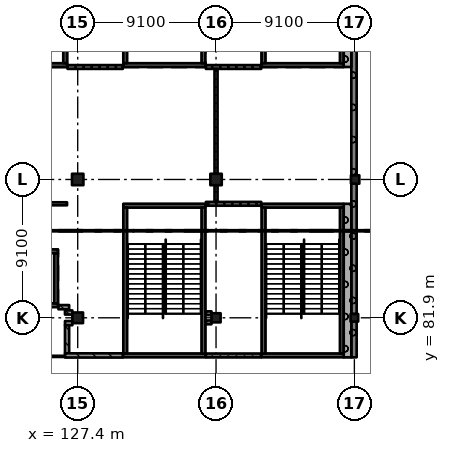
"""IFC4 building model, lengths in metres.
Left out: names, types, materials, properties, quantities, classifications, styles, units other than length and angle.
Written with IfcOpenShell. Run it as: python <this file> out.ifc"""

import sys

from ifc_helpers import new_model, si_unit, direction, frame, frame_2d, origin, origin_2d, place, context, subcontext, project, spatial, rectangle, extrude, element, fill, save


model = new_model("IFC4")
c1 = context("Model", 3, precision=1e-05, world=origin(), true_north=direction((0.0, 1.0)))
c2 = subcontext(c1, "Body", "Model", "MODEL_VIEW")
j1 = project(units=[si_unit("LENGTHUNIT", "METRE"), si_unit("PLANEANGLEUNIT", "RADIAN")], contexts=[c1])
p1 = place(None, origin())
s1 = spatial("IfcSite", under=j1, at=p1, CompositionType="ELEMENT")
p2 = place(p1, origin())
s2 = spatial("IfcBuilding", under=s1, at=p2, CompositionType="ELEMENT")
p3 = place(p2, frame((0.0, 0.0, 10.92)))
s3 = spatial("IfcBuildingStorey", under=s2, at=p3, CompositionType="ELEMENT", Elevation=10.92)
p4 = place(p3, frame((127.4, 81.9, 0.0), z_axis=(0.0, 0.0, 1.0), x_axis=(1.0, 0.0, 0.0)))
e1 = element("IfcColumn", 1, at=p4, inside=s3, PredefinedType="COLUMN", context=c2, shape_type="SweptSolid", body=[
    extrude(rectangle(XDim=0.7, YDim=0.7, at=origin_2d()), origin(), (0.0, 0.0, 1.0), 4.55),
])
p5 = place(p3, frame((127.4, 91.0, 0.0), z_axis=(0.0, 0.0, 1.0), x_axis=(1.0, 0.0, 0.0)))
e2 = element("IfcColumn", 2, at=p5, inside=s3, PredefinedType="COLUMN", context=c2, shape_type="SweptSolid", body=[
    extrude(rectangle(XDim=0.75, YDim=0.75, at=origin_2d()), origin(), (0.0, 0.0, 1.0), 4.55),
])
p6 = place(p3, frame((136.5, 81.9, 0.0), z_axis=(0.0, 0.0, 1.0), x_axis=(1.0, 0.0, 0.0)))
e3 = element("IfcColumn", 3, at=p6, inside=s3, PredefinedType="COLUMN", context=c2, shape_type="SweptSolid", body=[
    extrude(rectangle(XDim=0.6, YDim=0.6, at=origin_2d()), origin(), (0.0, 0.0, 1.0), 4.55),
])
p7 = place(p3, frame((136.5, 91.0, 0.0), z_axis=(0.0, 0.0, 1.0), x_axis=(1.0, 0.0, 0.0)))
e4 = element("IfcColumn", 4, at=p7, inside=s3, PredefinedType="COLUMN", context=c2, shape_type="SweptSolid", body=[
    extrude(rectangle(XDim=0.75, YDim=0.75, at=origin_2d()), origin(), (0.0, 0.0, 1.0), 4.55),
])
p8 = place(p3, frame((145.6, 81.9, 0.0), z_axis=(0.0, 0.0, 1.0), x_axis=(1.0, 0.0, 0.0)))
e5 = element("IfcColumn", 5, at=p8, inside=s3, PredefinedType="COLUMN", context=c2, shape_type="SweptSolid", body=[
    extrude(rectangle(XDim=0.5, YDim=0.5, at=origin_2d()), origin(), (0.0, 0.0, 1.0), 4.55),
])
p9 = place(p3, frame((145.65, 91.0, 0.0), z_axis=(0.0, 0.0, 1.0), x_axis=(1.0, 0.0, 0.0)))
e6 = element("IfcColumn", 6, at=p9, inside=s3, PredefinedType="COLUMN", context=c2, shape_type="SweptSolid", body=[
    extrude(rectangle(XDim=0.55, YDim=0.55, at=origin_2d()), origin(), (0.0, 0.0, 1.0), 4.55),
])
p10 = place(p3, frame((126.1, 82.725, 0.0), z_axis=(0.0, 0.0, 1.0), x_axis=(-1.0, 0.0, 0.0)))
e7 = element("IfcWall", 7, at=p10, inside=s3, PredefinedType="SHEAR", context=c2, shape_type="SweptSolid", body=[
    extrude(rectangle(XDim=3.0, YDim=0.25, at=frame_2d((1.5, 0.0))), origin(), (0.0, 0.0, 1.0), 4.55),
])
p11 = place(p3, frame((126.1, 86.275, 0.0), z_axis=(0.0, 0.0, 1.0), x_axis=(-1.0, 0.0, 0.0)))
e8 = element("IfcWall", 8, at=p11, inside=s3, PredefinedType="SHEAR", context=c2, shape_type="SweptSolid", body=[
    extrude(rectangle(XDim=3.0, YDim=0.25, at=frame_2d((1.5, 0.0))), origin(), (0.0, 0.0, 1.0), 4.55),
])
p12 = place(p11, frame((0.95, 0.0, 0.0)))
e9 = element("IfcOpeningElement", 9, at=p12, cuts=e8, PredefinedType="OPENING", context=c2, shape_type="SweptSolid", body=[
    extrude(rectangle(XDim=1.1, YDim=2.1, at=frame_2d((0.55, 1.05))), frame((0.0, 0.135, 0.0), z_axis=(0.0, -1.0, 0.0), x_axis=(1.0, 0.0, 0.0)), (0.0, 0.0, 1.0), 0.27),
])
p13 = place(p3, frame((125.975, 86.15, 0.0), z_axis=(0.0, 0.0, 1.0), x_axis=(0.0, -1.0, 0.0)))
e10 = element("IfcWall", 10, at=p13, inside=s3, PredefinedType="SHEAR", context=c2, shape_type="SweptSolid", body=[
    extrude(rectangle(XDim=3.3, YDim=0.25, at=frame_2d((1.65, 0.0))), origin(), (0.0, 0.0, 1.0), 4.55),
])
p14 = place(p3, frame((144.9, 98.525, 0.0), z_axis=(0.0, 0.0, 1.0), x_axis=(-1.0, 0.0, 0.0)))
e11 = element("IfcWall", 11, at=p14, inside=s3, PredefinedType="SHEAR", context=c2, shape_type="SweptSolid", body=[
    extrude(rectangle(XDim=5.4, YDim=0.25, at=frame_2d((2.7, 0.0))), origin(), (0.0, 0.0, 1.0), 4.55),
])
p15 = place(p14, frame((1.5, 0.0, 0.0)))
e12 = element("IfcOpeningElement", 12, at=p15, cuts=e11, PredefinedType="OPENING", context=c2, shape_type="SweptSolid", body=[
    extrude(rectangle(XDim=2.4, YDim=2.1, at=frame_2d((1.2, 1.05))), frame((0.0, 0.135, 0.0), z_axis=(0.0, -1.0, 0.0), x_axis=(1.0, 0.0, 0.0)), (0.0, 0.0, 1.0), 0.27),
])
for number, where, z_axis, x_axis in (
    (13, (139.625, 108.25, 0.0), (0.0, 0.0, 1.0), (0.0, -1.0, 0.0)),
    (14, (144.775, 108.25, 0.0), (0.0, 0.0, 1.0), (0.0, -1.0, 0.0)),
):
    element("IfcWall", number, at=place(p3, frame(where, z_axis=z_axis, x_axis=x_axis)), inside=s3, PredefinedType="SHEAR", context=c2, shape_type="SweptSolid", body=[
        extrude(rectangle(XDim=9.6, YDim=0.25, at=frame_2d((4.8, 0.0))), origin(), (0.0, 0.0, 1.0), 4.55),
    ])
p16 = place(p3, frame((135.8, 98.525, 0.0), z_axis=(0.0, 0.0, 1.0), x_axis=(-1.0, 0.0, 0.0)))
e15 = element("IfcWall", 15, at=p16, inside=s3, PredefinedType="SHEAR", context=c2, shape_type="SweptSolid", body=[
    extrude(rectangle(XDim=5.4, YDim=0.25, at=frame_2d((2.7, 0.0))), origin(), (0.0, 0.0, 1.0), 4.55),
])
p17 = place(p16, frame((1.5, 0.0, 0.0)))
e16 = element("IfcOpeningElement", 16, at=p17, cuts=e15, PredefinedType="OPENING", context=c2, shape_type="SweptSolid", body=[
    extrude(rectangle(XDim=2.4, YDim=2.1, at=frame_2d((1.2, 1.05))), frame((0.0, 0.135, 0.0), z_axis=(0.0, -1.0, 0.0), x_axis=(1.0, 0.0, 0.0)), (0.0, 0.0, 1.0), 0.27),
])
for number, where, z_axis, x_axis in (
    (17, (130.525, 108.25, 0.0), (0.0, 0.0, 1.0), (0.0, -1.0, 0.0)),
    (18, (135.675, 108.25, 0.0), (0.0, 0.0, 1.0), (0.0, -1.0, 0.0)),
):
    element("IfcWall", number, at=place(p3, frame(where, z_axis=z_axis, x_axis=x_axis)), inside=s3, PredefinedType="SHEAR", context=c2, shape_type="SweptSolid", body=[
        extrude(rectangle(XDim=9.6, YDim=0.25, at=frame_2d((4.8, 0.0))), origin(), (0.0, 0.0, 1.0), 4.55),
    ])
p18 = place(p3, frame((126.7, 98.525, 0.0), z_axis=(0.0, 0.0, 1.0), x_axis=(-1.0, 0.0, 0.0)))
e19 = element("IfcWall", 19, at=p18, inside=s3, PredefinedType="SHEAR", context=c2, shape_type="SweptSolid", body=[
    extrude(rectangle(XDim=5.4, YDim=0.25, at=frame_2d((2.7, 0.0))), origin(), (0.0, 0.0, 1.0), 4.55),
])
p19 = place(p18, frame((1.5, 0.0, 0.0)))
e20 = element("IfcOpeningElement", 20, at=p19, cuts=e19, PredefinedType="OPENING", context=c2, shape_type="SweptSolid", body=[
    extrude(rectangle(XDim=2.4, YDim=2.1, at=frame_2d((1.2, 1.05))), frame((0.0, 0.135, 0.0), z_axis=(0.0, -1.0, 0.0), x_axis=(1.0, 0.0, 0.0)), (0.0, 0.0, 1.0), 0.27),
])
p20 = place(p3, frame((126.575, 108.25, 0.0), z_axis=(0.0, 0.0, 1.0), x_axis=(0.0, -1.0, 0.0)))
e21 = element("IfcWall", 21, at=p20, inside=s3, PredefinedType="SHEAR", context=c2, shape_type="SweptSolid", body=[
    extrude(rectangle(XDim=9.6, YDim=0.25, at=frame_2d((4.8, 0.0))), origin(), (0.0, 0.0, 1.0), 4.55),
])
p21 = place(p3, frame((144.9, 79.425, 0.0), z_axis=(0.0, 0.0, 1.0), x_axis=(-1.0, 0.0, 0.0)))
e22 = element("IfcWall", 22, at=p21, inside=s3, PredefinedType="SHEAR", context=c2, shape_type="SweptSolid", body=[
    extrude(rectangle(XDim=5.4, YDim=0.25, at=frame_2d((2.7, 0.0))), origin(), (0.0, 0.0, 1.0), 4.55),
])
p22 = place(p3, frame((144.9, 89.275, 0.0), z_axis=(0.0, 0.0, 1.0), x_axis=(-1.0, 0.0, 0.0)))
e23 = element("IfcWall", 23, at=p22, inside=s3, PredefinedType="SHEAR", context=c2, shape_type="SweptSolid", body=[
    extrude(rectangle(XDim=5.4, YDim=0.25, at=frame_2d((2.7, 0.0))), origin(), (0.0, 0.0, 1.0), 4.55),
])
p23 = place(p22, frame((1.5, 0.0, 0.0)))
e24 = element("IfcOpeningElement", 24, at=p23, cuts=e23, PredefinedType="OPENING", context=c2, shape_type="SweptSolid", body=[
    extrude(rectangle(XDim=2.4, YDim=2.1, at=frame_2d((1.2, 1.05))), frame((0.0, 0.135, 0.0), z_axis=(0.0, -1.0, 0.0), x_axis=(1.0, 0.0, 0.0)), (0.0, 0.0, 1.0), 0.27),
])
for number, where, z_axis, x_axis in (
    (25, (139.625, 89.15, 0.0), (0.0, 0.0, 1.0), (0.0, -1.0, 0.0)),
    (26, (144.775, 89.15, 0.0), (0.0, 0.0, 1.0), (0.0, -1.0, 0.0)),
):
    element("IfcWall", number, at=place(p3, frame(where, z_axis=z_axis, x_axis=x_axis)), inside=s3, PredefinedType="SHEAR", context=c2, shape_type="SweptSolid", body=[
        extrude(rectangle(XDim=9.6, YDim=0.25, at=frame_2d((4.8, 0.0))), origin(), (0.0, 0.0, 1.0), 4.55),
    ])
p24 = place(p3, frame((135.8, 79.425, 0.0), z_axis=(0.0, 0.0, 1.0), x_axis=(-1.0, 0.0, 0.0)))
e27 = element("IfcWall", 27, at=p24, inside=s3, PredefinedType="SHEAR", context=c2, shape_type="SweptSolid", body=[
    extrude(rectangle(XDim=5.4, YDim=0.25, at=frame_2d((2.7, 0.0))), origin(), (0.0, 0.0, 1.0), 4.55),
])
p25 = place(p3, frame((135.8, 89.275, 0.0), z_axis=(0.0, 0.0, 1.0), x_axis=(-1.0, 0.0, 0.0)))
e28 = element("IfcWall", 28, at=p25, inside=s3, PredefinedType="SHEAR", context=c2, shape_type="SweptSolid", body=[
    extrude(rectangle(XDim=5.4, YDim=0.25, at=frame_2d((2.7, 0.0))), origin(), (0.0, 0.0, 1.0), 4.55),
])
p26 = place(p25, frame((1.5, 0.0, 0.0)))
e29 = element("IfcOpeningElement", 29, at=p26, cuts=e28, PredefinedType="OPENING", context=c2, shape_type="SweptSolid", body=[
    extrude(rectangle(XDim=2.4, YDim=2.1, at=frame_2d((1.2, 1.05))), frame((0.0, 0.135, 0.0), z_axis=(0.0, -1.0, 0.0), x_axis=(1.0, 0.0, 0.0)), (0.0, 0.0, 1.0), 0.27),
])
for number, where, z_axis, x_axis in (
    (30, (130.525, 89.15, 0.0), (0.0, 0.0, 1.0), (0.0, -1.0, 0.0)),
    (31, (135.675, 89.15, 0.0), (0.0, 0.0, 1.0), (0.0, -1.0, 0.0)),
):
    element("IfcWall", number, at=place(p3, frame(where, z_axis=z_axis, x_axis=x_axis)), inside=s3, PredefinedType="SHEAR", context=c2, shape_type="SweptSolid", body=[
        extrude(rectangle(XDim=9.6, YDim=0.25, at=frame_2d((4.8, 0.0))), origin(), (0.0, 0.0, 1.0), 4.55),
    ])
p27 = place(p3, frame((145.575, 79.3, 0.0), z_axis=(0.0, 0.0, 1.0), x_axis=(0.0, 1.0, 0.0)))
e32 = element("IfcWall", 32, at=p27, inside=s3, PredefinedType="SOLIDWALL", context=c2, shape_type="SweptSolid", body=[
    extrude(rectangle(XDim=2.35, YDim=0.35, at=frame_2d((1.175, 0.0))), origin(), (0.0, 0.0, 1.0), 3.5),
])
for number, where, z_axis, x_axis in (
    (33, (145.575, 82.15, 0.0), (0.0, 0.0, 1.0), (0.0, 1.0, 0.0)),
    (34, (145.575, 91.275, 0.0), (0.0, 0.0, 1.0), (0.0, 1.0, 0.0)),
):
    element("IfcWall", number, at=place(p3, frame(where, z_axis=z_axis, x_axis=x_axis)), inside=s3, PredefinedType="SOLIDWALL", context=c2, shape_type="SweptSolid", body=[
        extrude(rectangle(XDim=8.575, YDim=0.35, at=frame_2d((4.288, 0.0))), origin(), (0.0, 0.0, 1.0), 3.5),
    ])
p28 = place(p3, frame((145.15, 98.4, 0.0), z_axis=(0.0, 0.0, 1.0), x_axis=(0.0, 1.0, 0.0)))
e35 = element("IfcWall", 35, at=p28, inside=s3, PredefinedType="SOLIDWALL", context=c2, shape_type="SweptSolid", body=[
    extrude(rectangle(XDim=10.1, YDim=0.5, at=frame_2d((5.05, 0.0))), origin(), (0.0, 0.0, 1.0), 4.55),
])
p29 = place(p3, frame((145.15, 79.3, 0.0), z_axis=(0.0, 0.0, 1.0), x_axis=(0.0, 1.0, 0.0)))
e36 = element("IfcWall", 36, at=p29, inside=s3, PredefinedType="SOLIDWALL", context=c2, shape_type="SweptSolid", body=[
    extrude(rectangle(XDim=10.1, YDim=0.5, at=frame_2d((5.05, 0.0))), origin(), (0.0, 0.0, 1.0), 4.55),
])
p30 = place(p3, frame((126.13, 82.6, 0.0), z_axis=(0.0, 0.0, 1.0), x_axis=(1.0, 0.0, 0.0)))
e37 = element("IfcWall", 37, at=p30, inside=s3, PredefinedType="SOLIDWALL", context=c2, shape_type="SweptSolid", body=[
    extrude(rectangle(XDim=0.708, YDim=0.275, at=frame_2d((0.354, 0.0))), origin(), (0.0, 0.0, 1.0), 4.25),
])
p31 = place(p3, frame((126.562, 81.55, 0.0), z_axis=(0.0, 0.0, 1.0), x_axis=(1.0, 0.0, 0.0)))
e38 = element("IfcWall", 38, at=p31, inside=s3, PredefinedType="SOLIDWALL", context=c2, shape_type="SweptSolid", body=[
    extrude(rectangle(XDim=0.488, YDim=0.275, at=frame_2d((0.244, 0.0))), origin(), (0.0, 0.0, 1.0), 4.25),
])
p32 = place(p3, frame((126.7, 79.562, 0.0), z_axis=(0.0, 0.0, 1.0), x_axis=(0.0, 1.0, 0.0)))
e39 = element("IfcWall", 39, at=p32, inside=s3, PredefinedType="SOLIDWALL", context=c2, shape_type="SweptSolid", body=[
    extrude(rectangle(XDim=1.85, YDim=0.275, at=frame_2d((0.925, 0.0))), origin(), (0.0, 0.0, 1.0), 4.25),
])
p33 = place(p3, frame((126.7, 89.4, 0.0), z_axis=(0.0, 0.0, 1.0), x_axis=(-1.0, 0.0, 0.0)))
e40 = element("IfcWall", 40, at=p33, inside=s3, PredefinedType="PARTITIONING", context=c2, shape_type="SweptSolid", body=[
    extrude(rectangle(XDim=5.4, YDim=0.2, at=frame_2d((2.7, 0.0))), origin(), (0.0, 0.0, 1.0), 4.25),
])
p34 = place(p33, frame((1.85, 0.0, 0.0)))
e41 = element("IfcOpeningElement", 41, at=p34, cuts=e40, PredefinedType="OPENING", context=c2, shape_type="SweptSolid", body=[
    extrude(rectangle(XDim=1.8, YDim=2.4, at=frame_2d((0.9, 1.2))), frame((0.0, 0.11, 0.0), z_axis=(0.0, -1.0, 0.0), x_axis=(1.0, 0.0, 0.0)), (0.0, 0.0, 1.0), 0.22),
])
p35 = place(p3, frame((126.73, 98.4, 0.0), z_axis=(0.0, 0.0, 1.0), x_axis=(1.0, 0.0, 0.0)))
e42 = element("IfcWall", 42, at=p35, inside=s3, PredefinedType="SOLIDWALL", context=c2, shape_type="SweptSolid", body=[
    extrude(rectangle(XDim=3.64, YDim=0.25, at=frame_2d((1.82, 0.0))), origin(), (0.0, 0.0, 1.0), 4.25),
])
p36 = place(p35, frame((1.35, 0.0, 0.0)))
e43 = element("IfcOpeningElement", 43, at=p36, cuts=e42, PredefinedType="OPENING", context=c2, shape_type="SweptSolid", body=[
    extrude(rectangle(XDim=1.0, YDim=2.1, at=frame_2d((0.5, 1.05))), frame((0.0, 0.135, 0.0), z_axis=(0.0, -1.0, 0.0), x_axis=(1.0, 0.0, 0.0)), (0.0, 0.0, 1.0), 0.27),
])
p37 = place(p3, frame((127.05, 82.25, 0.0), z_axis=(0.0, 0.0, 1.0), x_axis=(-1.0, 0.0, 0.0)))
e44 = element("IfcWall", 44, at=p37, inside=s3, PredefinedType="SOLIDWALL", context=c2, shape_type="SweptSolid", body=[
    extrude(rectangle(XDim=0.488, YDim=0.275, at=frame_2d((0.244, 0.0))), origin(), (0.0, 0.0, 1.0), 4.25),
])
p38 = place(p3, frame((130.37, 79.425, 0.0), z_axis=(0.0, 0.0, 1.0), x_axis=(-1.0, 0.0, 0.0)))
e45 = element("IfcWall", 45, at=p38, inside=s3, PredefinedType="SOLIDWALL", context=c2, shape_type="SweptSolid", body=[
    extrude(rectangle(XDim=3.808, YDim=0.275, at=frame_2d((1.904, 0.0))), origin(), (0.0, 0.0, 1.0), 4.25),
])
p39 = place(p3, frame((135.83, 81.6, 0.0), z_axis=(0.0, 0.0, 1.0), x_axis=(1.0, 0.0, 0.0)))
e46 = element("IfcWall", 46, at=p39, inside=s3, PredefinedType="SOLIDWALL", context=c2, shape_type="SweptSolid", body=[
    extrude(rectangle(XDim=0.37, YDim=0.25, at=frame_2d((0.185, 0.0))), origin(), (0.0, 0.0, 1.0), 4.25),
])
p40 = place(p3, frame((135.83, 98.4, 0.0), z_axis=(0.0, 0.0, 1.0), x_axis=(1.0, 0.0, 0.0)))
e47 = element("IfcWall", 47, at=p40, inside=s3, PredefinedType="SOLIDWALL", context=c2, shape_type="SweptSolid", body=[
    extrude(rectangle(XDim=3.64, YDim=0.25, at=frame_2d((1.82, 0.0))), origin(), (0.0, 0.0, 1.0), 4.25),
])
p41 = place(p40, frame((1.72, 0.0, 0.0)))
e48 = element("IfcOpeningElement", 48, at=p41, cuts=e47, PredefinedType="OPENING", context=c2, shape_type="SweptSolid", body=[
    extrude(rectangle(XDim=0.8, YDim=2.1, at=frame_2d((0.4, 1.05))), frame((0.0, 0.135, 0.0), z_axis=(0.0, -1.0, 0.0), x_axis=(1.0, 0.0, 0.0)), (0.0, 0.0, 1.0), 0.27),
])
p42 = place(p3, frame((136.2, 82.2, 0.0), z_axis=(0.0, 0.0, 1.0), x_axis=(-1.0, 0.0, 0.0)))
e49 = element("IfcWall", 49, at=p42, inside=s3, PredefinedType="SOLIDWALL", context=c2, shape_type="SweptSolid", body=[
    extrude(rectangle(XDim=0.37, YDim=0.25, at=frame_2d((0.185, 0.0))), origin(), (0.0, 0.0, 1.0), 4.25),
])
p43 = place(p3, frame((135.83, 89.4, 0.0), z_axis=(0.0, 0.0, 1.0), x_axis=(1.0, 0.0, 0.0)))
e50 = element("IfcWall", 50, at=p43, inside=s3, PredefinedType="SOLIDWALL", context=c2, shape_type="SweptSolid", body=[
    extrude(rectangle(XDim=3.64, YDim=0.25, at=frame_2d((1.82, 0.0))), origin(), (0.0, 0.0, 1.0), 4.25),
])
p44 = place(p43, frame((1.79, 0.0, 0.0)))
e51 = element("IfcOpeningElement", 51, at=p44, cuts=e50, PredefinedType="OPENING", context=c2, shape_type="SweptSolid", body=[
    extrude(rectangle(XDim=0.8, YDim=2.1, at=frame_2d((0.4, 1.05))), frame((0.0, 0.135, 0.0), z_axis=(0.0, -1.0, 0.0), x_axis=(1.0, 0.0, 0.0)), (0.0, 0.0, 1.0), 0.27),
])
p45 = place(p3, frame((136.5, 89.525, 0.0), z_axis=(0.0, 0.0, 1.0), x_axis=(0.0, 1.0, 0.0)))
e52 = element("IfcWall", 52, at=p45, inside=s3, PredefinedType="PARTITIONING", context=c2, shape_type="SweptSolid", body=[
    extrude(rectangle(XDim=1.1, YDim=0.2, at=frame_2d((0.55, 0.0))), origin(), (0.0, 0.0, 1.0), 3.5),
])
p46 = place(p3, frame((136.5, 91.375, 0.0), z_axis=(0.0, 0.0, 1.0), x_axis=(0.0, 1.0, 0.0)))
e53 = element("IfcWall", 53, at=p46, inside=s3, PredefinedType="PARTITIONING", context=c2, shape_type="SweptSolid", body=[
    extrude(rectangle(XDim=6.9, YDim=0.2, at=frame_2d((3.45, 0.0))), origin(), (0.0, 0.0, 1.0), 3.55),
])
p47 = place(p46, frame((0.85, 0.0, 0.0)))
e54 = element("IfcOpeningElement", 54, at=p47, cuts=e53, PredefinedType="OPENING", context=c2, shape_type="SweptSolid", body=[
    extrude(rectangle(XDim=1.8, YDim=2.4, at=frame_2d((0.9, 1.2))), frame((0.0, 0.11, 0.0), z_axis=(0.0, -1.0, 0.0), x_axis=(1.0, 0.0, 0.0)), (0.0, 0.0, 1.0), 0.22),
])
p48 = place(p46, frame((4.25, 0.0, 0.0)))
e55 = element("IfcOpeningElement", 55, at=p48, cuts=e53, PredefinedType="OPENING", context=c2, shape_type="SweptSolid", body=[
    extrude(rectangle(XDim=1.8, YDim=2.4, at=frame_2d((0.9, 1.2))), frame((0.0, 0.11, 0.0), z_axis=(0.0, -1.0, 0.0), x_axis=(1.0, 0.0, 0.0)), (0.0, 0.0, 1.0), 0.22),
])
p49 = place(p3, frame((139.47, 79.425, 0.0), z_axis=(0.0, 0.0, 1.0), x_axis=(-1.0, 0.0, 0.0)))
e56 = element("IfcWall", 56, at=p49, inside=s3, PredefinedType="SOLIDWALL", context=c2, shape_type="SweptSolid", body=[
    extrude(rectangle(XDim=3.64, YDim=0.25, at=frame_2d((1.82, 0.0))), origin(), (0.0, 0.0, 1.0), 4.25),
])
p50 = place(p44, origin())
e57 = element("IfcDoor", 57, at=p50, inside=s3, OperationType="SINGLE_SWING_RIGHT", PredefinedType="DOOR", context=c2, shape_type="SweptSolid", body=[
    extrude(rectangle(XDim=0.8, YDim=2.1, at=frame_2d((0.4, 1.05))), frame((0.0, 0.025, 0.0), z_axis=(0.0, -1.0, 0.0), x_axis=(1.0, 0.0, 0.0)), (0.0, 0.0, 1.0), 0.05),
])
fill(e51, e57)
p51 = place(p41, origin())
e58 = element("IfcDoor", 58, at=p51, inside=s3, OperationType="SINGLE_SWING_RIGHT", PredefinedType="DOOR", context=c2, shape_type="SweptSolid", body=[
    extrude(rectangle(XDim=0.8, YDim=2.1, at=frame_2d((0.4, 1.05))), frame((0.0, 0.025, 0.0), z_axis=(0.0, -1.0, 0.0), x_axis=(1.0, 0.0, 0.0)), (0.0, 0.0, 1.0), 0.05),
])
fill(e48, e58)
p52 = place(p36, origin())
e59 = element("IfcDoor", 59, at=p52, inside=s3, OperationType="SINGLE_SWING_LEFT", PredefinedType="DOOR", context=c2, shape_type="SweptSolid", body=[
    extrude(rectangle(XDim=1.0, YDim=2.1, at=frame_2d((0.5, 1.05))), frame((0.0, 0.025, 0.0), z_axis=(0.0, -1.0, 0.0), x_axis=(1.0, 0.0, 0.0)), (0.0, 0.0, 1.0), 0.05),
])
fill(e43, e59)
p53 = place(p47, origin())
e60 = element("IfcDoor", 60, at=p53, inside=s3, OperationType="DOUBLE_DOOR_SINGLE_SWING", PredefinedType="DOOR", context=c2, shape_type="SweptSolid", body=[
    extrude(rectangle(XDim=1.8, YDim=2.4, at=frame_2d((0.9, 1.2))), frame((0.0, 0.025, 0.0), z_axis=(0.0, -1.0, 0.0), x_axis=(1.0, 0.0, 0.0)), (0.0, 0.0, 1.0), 0.05),
])
fill(e54, e60)
p54 = place(p48, origin())
e61 = element("IfcDoor", 61, at=p54, inside=s3, OperationType="DOUBLE_DOOR_SINGLE_SWING", PredefinedType="DOOR", context=c2, shape_type="SweptSolid", body=[
    extrude(rectangle(XDim=1.8, YDim=2.4, at=frame_2d((0.9, 1.2))), frame((0.0, 0.025, 0.0), z_axis=(0.0, -1.0, 0.0), x_axis=(1.0, 0.0, 0.0)), (0.0, 0.0, 1.0), 0.05),
])
fill(e55, e61)
p55 = place(p15, origin())
e62 = element("IfcDoor", 62, at=p55, inside=s3, OperationType="DOUBLE_DOOR_SINGLE_SWING", PredefinedType="DOOR", context=c2, shape_type="SweptSolid", body=[
    extrude(rectangle(XDim=2.4, YDim=2.1, at=frame_2d((1.2, 1.05))), frame((0.0, 0.025, 0.0), z_axis=(0.0, -1.0, 0.0), x_axis=(1.0, 0.0, 0.0)), (0.0, 0.0, 1.0), 0.05),
])
fill(e12, e62)
p56 = place(p17, origin())
e63 = element("IfcDoor", 63, at=p56, inside=s3, OperationType="DOUBLE_DOOR_SINGLE_SWING", PredefinedType="DOOR", context=c2, shape_type="SweptSolid", body=[
    extrude(rectangle(XDim=2.4, YDim=2.1, at=frame_2d((1.2, 1.05))), frame((0.0, 0.025, 0.0), z_axis=(0.0, -1.0, 0.0), x_axis=(1.0, 0.0, 0.0)), (0.0, 0.0, 1.0), 0.05),
])
fill(e16, e63)
p57 = place(p23, origin())
e64 = element("IfcDoor", 64, at=p57, inside=s3, OperationType="DOUBLE_DOOR_SINGLE_SWING", PredefinedType="DOOR", context=c2, shape_type="SweptSolid", body=[
    extrude(rectangle(XDim=2.4, YDim=2.1, at=frame_2d((1.2, 1.05))), frame((0.0, 0.025, 0.0), z_axis=(0.0, -1.0, 0.0), x_axis=(1.0, 0.0, 0.0)), (0.0, 0.0, 1.0), 0.05),
])
fill(e24, e64)
p58 = place(p26, origin())
e65 = element("IfcDoor", 65, at=p58, inside=s3, OperationType="DOUBLE_DOOR_SINGLE_SWING", PredefinedType="DOOR", context=c2, shape_type="SweptSolid", body=[
    extrude(rectangle(XDim=2.4, YDim=2.1, at=frame_2d((1.2, 1.05))), frame((0.0, 0.025, 0.0), z_axis=(0.0, -1.0, 0.0), x_axis=(1.0, 0.0, 0.0)), (0.0, 0.0, 1.0), 0.05),
])
fill(e29, e65)
save(model, sys.argv[1])
